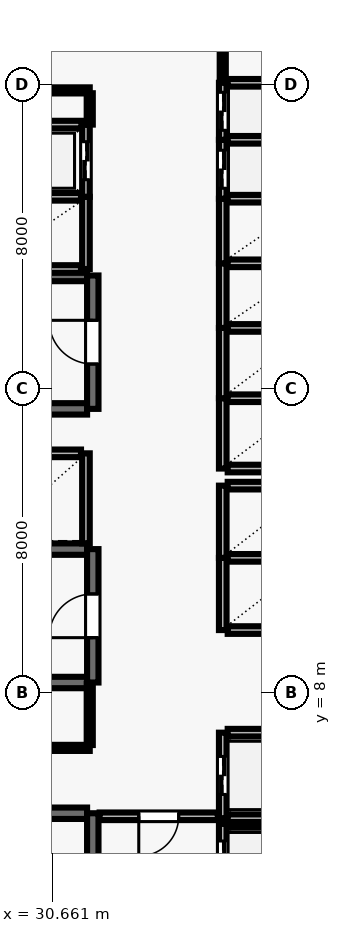
"""IFC4 building model, lengths in metres.
Left out: names, types, materials, properties, quantities, classifications, styles, units other than length and angle.
Written with IfcOpenShell. Run it as: python <this file> out.ifc"""

import sys

from ifc_helpers import new_model, si_unit, direction, frame, frame_2d, origin, place, context, subcontext, project, spatial, rectangle, extrude, element, fill, save


model = new_model("IFC4")
c1 = context("Model", 3, precision=1e-05, world=origin(), true_north=direction((0.0, 1.0)))
c2 = subcontext(c1, "Body", "Model", "MODEL_VIEW")
j1 = project(units=[si_unit("LENGTHUNIT", "METRE"), si_unit("PLANEANGLEUNIT", "RADIAN")], contexts=[c1])
p1 = place(None, origin())
s1 = spatial("IfcSite", under=j1, at=p1, CompositionType="ELEMENT")
p2 = place(p1, origin())
s2 = spatial("IfcBuilding", under=s1, at=p2, CompositionType="ELEMENT")
p3 = place(p2, frame((0.0, 0.0, 26.0)))
s3 = spatial("IfcBuildingStorey", under=s2, at=p3, CompositionType="ELEMENT", Elevation=26.0)
p4 = place(p3, frame((31.58, 4.83, 0.0), z_axis=(0.0, 0.0, 1.0), x_axis=(-1.0, 0.0, 0.0)))
e1 = element("IfcWall", 1, at=p4, inside=s3, PredefinedType="SHEAR", context=c2, shape_type="SweptSolid", body=[
    extrude(rectangle(XDim=8.36, YDim=0.3, at=frame_2d((4.18, 0.0))), origin(), (0.0, 0.0, 1.0), 4.79),
])
p5 = place(p3, frame((31.73, 0.96, 0.0), z_axis=(0.0, 0.0, 1.0), x_axis=(0.0, 1.0, 0.0)))
e2 = element("IfcWall", 2, at=p5, inside=s3, PredefinedType="SHEAR", context=c2, shape_type="SweptSolid", body=[
    extrude(rectangle(XDim=3.87, YDim=0.3, at=frame_2d((1.935, 0.0))), origin(), (0.0, 0.0, 1.0), 4.79),
])
p6 = place(p5, frame((1.54, 0.0, 0.0)))
e3 = element("IfcOpeningElement", 3, at=p6, cuts=e2, PredefinedType="OPENING", context=c2, shape_type="SweptSolid", body=[
    extrude(rectangle(XDim=1.15, YDim=2.15, at=frame_2d((0.575, 1.075))), frame((0.0, 0.16, 0.0), z_axis=(0.0, -1.0, 0.0), x_axis=(1.0, 0.0, 0.0)), (0.0, 0.0, 1.0), 0.32),
])
for number, where, z_axis, x_axis in (
    (4, (31.58, 18.98, 0.0), (0.0, 0.0, 1.0), (-1.0, 0.0, 0.0)),
    (5, (23.22, 15.47, 0.0), (0.0, 0.0, 1.0), (1.0, 0.0, 0.0)),
):
    element("IfcWall", number, at=place(p3, frame(where, z_axis=z_axis, x_axis=x_axis)), inside=s3, PredefinedType="SHEAR", context=c2, shape_type="SweptSolid", body=[
        extrude(rectangle(XDim=8.36, YDim=0.3, at=frame_2d((4.18, 0.0))), origin(), (0.0, 0.0, 1.0), 4.79),
    ])
p7 = place(p3, frame((31.73, 15.47, 0.0), z_axis=(0.0, 0.0, 1.0), x_axis=(0.0, 1.0, 0.0)))
e6 = element("IfcWall", 6, at=p7, inside=s3, PredefinedType="SHEAR", context=c2, shape_type="SweptSolid", body=[
    extrude(rectangle(XDim=3.51, YDim=0.3, at=frame_2d((1.755, 0.0))), origin(), (0.0, 0.0, 1.0), 4.79),
])
p8 = place(p7, frame((1.18, 0.0, 0.0)))
e7 = element("IfcOpeningElement", 7, at=p8, cuts=e6, PredefinedType="OPENING", context=c2, shape_type="SweptSolid", body=[
    extrude(rectangle(XDim=1.15, YDim=2.15, at=frame_2d((0.575, 1.075))), frame((0.0, 0.16, 0.0), z_axis=(0.0, -1.0, 0.0), x_axis=(1.0, 0.0, 0.0)), (0.0, 0.0, 1.0), 0.32),
])
for number, where, z_axis, x_axis in (
    (8, (31.58, 11.78, 0.0), (0.0, 0.0, 1.0), (-1.0, 0.0, 0.0)),
    (9, (23.22, 8.27, 0.0), (0.0, 0.0, 1.0), (1.0, 0.0, 0.0)),
):
    element("IfcWall", number, at=place(p3, frame(where, z_axis=z_axis, x_axis=x_axis)), inside=s3, PredefinedType="SHEAR", context=c2, shape_type="SweptSolid", body=[
        extrude(rectangle(XDim=8.36, YDim=0.3, at=frame_2d((4.18, 0.0))), origin(), (0.0, 0.0, 1.0), 4.79),
    ])
p9 = place(p3, frame((31.73, 8.27, 0.0), z_axis=(0.0, 0.0, 1.0), x_axis=(0.0, 1.0, 0.0)))
e10 = element("IfcWall", 10, at=p9, inside=s3, PredefinedType="SHEAR", context=c2, shape_type="SweptSolid", body=[
    extrude(rectangle(XDim=3.51, YDim=0.3, at=frame_2d((1.755, 0.0))), origin(), (0.0, 0.0, 1.0), 4.79),
])
p10 = place(p9, frame((1.18, 0.0, 0.0)))
e11 = element("IfcOpeningElement", 11, at=p10, cuts=e10, PredefinedType="OPENING", context=c2, shape_type="SweptSolid", body=[
    extrude(rectangle(XDim=1.15, YDim=2.15, at=frame_2d((0.575, 1.075))), frame((0.0, 0.16, 0.0), z_axis=(0.0, -1.0, 0.0), x_axis=(1.0, 0.0, 0.0)), (0.0, 0.0, 1.0), 0.32),
])
p11 = place(p3, frame((35.15, 4.55, 0.0), z_axis=(0.0, 0.0, 1.0), x_axis=(0.0, -1.0, 0.0)))
e12 = element("IfcWall", 12, at=p11, inside=s3, PredefinedType="SOLIDWALL", context=c2, shape_type="SweptSolid", body=[
    extrude(rectangle(XDim=2.1, YDim=0.2, at=frame_2d((1.05, 0.0))), origin(), (0.0, 0.0, 1.0), 4.79),
])
p12 = place(p11, frame((0.45, 0.0, 0.0)))
e13 = element("IfcOpeningElement", 13, at=p12, cuts=e12, PredefinedType="OPENING", context=c2, shape_type="SweptSolid", body=[
    extrude(rectangle(XDim=1.2, YDim=2.15, at=frame_2d((0.6, 1.075))), frame((0.0, 0.11, 0.0), z_axis=(0.0, -1.0, 0.0), x_axis=(1.0, 0.0, 0.0)), (0.0, 0.0, 1.0), 0.22),
])
p13 = place(p3, frame((37.42, 4.55, 0.0), z_axis=(0.0, 0.0, 1.0), x_axis=(-1.0, 0.0, 0.0)))
e14 = element("IfcWall", 14, at=p13, inside=s3, PredefinedType="SOLIDWALL", context=c2, shape_type="SweptSolid", body=[
    extrude(rectangle(XDim=2.14, YDim=0.2, at=frame_2d((1.07, 0.0))), origin(), (0.0, 0.0, 1.0), 4.79),
])
p14 = place(p3, frame((35.15, 6.95, 0.0), z_axis=(0.0, 0.0, 1.0), x_axis=(0.0, -1.0, 0.0)))
e15 = element("IfcWall", 15, at=p14, inside=s3, PredefinedType="SOLIDWALL", context=c2, shape_type="SweptSolid", body=[
    extrude(rectangle(XDim=2.25, YDim=0.2, at=frame_2d((1.125, 0.0))), origin(), (0.0, 0.0, 1.0), 4.79),
])
p15 = place(p14, frame((0.625, 0.0, 0.0)))
e16 = element("IfcOpeningElement", 16, at=p15, cuts=e15, PredefinedType="OPENING", context=c2, shape_type="SweptSolid", body=[
    extrude(rectangle(XDim=1.0, YDim=2.1, at=frame_2d((0.5, 1.05))), frame((0.0, 0.11, 0.0), z_axis=(0.0, -1.0, 0.0), x_axis=(1.0, 0.0, 0.0)), (0.0, 0.0, 1.0), 0.22),
])
for number, where, z_axis, x_axis in (
    (17, (35.28, 4.7, 0.0), (0.0, 0.0, 1.0), (1.0, 0.0, 0.0)),
    (18, (37.42, 6.95, 0.0), (0.0, 0.0, 1.0), (-1.0, 0.0, 0.0)),
):
    element("IfcWall", number, at=place(p3, frame(where, z_axis=z_axis, x_axis=x_axis)), inside=s3, PredefinedType="SOLIDWALL", context=c2, shape_type="SweptSolid", body=[
        extrude(rectangle(XDim=2.14, YDim=0.2, at=frame_2d((1.07, 0.0))), origin(), (0.0, 0.0, 1.0), 4.79),
    ])
p16 = place(p3, frame((35.15, 11.55, 0.0), z_axis=(0.0, 0.0, 1.0), x_axis=(0.0, -1.0, 0.0)))
e19 = element("IfcWall", 19, at=p16, inside=s3, PredefinedType="SOLIDWALL", context=c2, shape_type="SweptSolid", body=[
    extrude(rectangle(XDim=1.9, YDim=0.2, at=frame_2d((0.95, 0.0))), origin(), (0.0, 0.0, 1.0), 4.79),
])
for number, where, z_axis, x_axis in (
    (20, (35.28, 9.65, 0.0), (0.0, 0.0, 1.0), (1.0, 0.0, 0.0)),
    (21, (37.42, 11.55, 0.0), (0.0, 0.0, 1.0), (-1.0, 0.0, 0.0)),
):
    element("IfcWall", number, at=place(p3, frame(where, z_axis=z_axis, x_axis=x_axis)), inside=s3, PredefinedType="SOLIDWALL", context=c2, shape_type="SweptSolid", body=[
        extrude(rectangle(XDim=2.14, YDim=0.2, at=frame_2d((1.07, 0.0))), origin(), (0.0, 0.0, 1.0), 4.79),
    ])
p17 = place(p3, frame((35.15, 13.45, 0.0), z_axis=(0.0, 0.0, 1.0), x_axis=(0.0, -1.0, 0.0)))
e22 = element("IfcWall", 22, at=p17, inside=s3, PredefinedType="SOLIDWALL", context=c2, shape_type="SweptSolid", body=[
    extrude(rectangle(XDim=1.9, YDim=0.2, at=frame_2d((0.95, 0.0))), origin(), (0.0, 0.0, 1.0), 4.79),
])
p18 = place(p3, frame((37.42, 13.45, 0.0), z_axis=(0.0, 0.0, 1.0), x_axis=(-1.0, 0.0, 0.0)))
e23 = element("IfcWall", 23, at=p18, inside=s3, PredefinedType="SOLIDWALL", context=c2, shape_type="SweptSolid", body=[
    extrude(rectangle(XDim=2.14, YDim=0.2, at=frame_2d((1.07, 0.0))), origin(), (0.0, 0.0, 1.0), 4.79),
])
p19 = place(p3, frame((31.55, 11.93, 0.0), z_axis=(0.0, 0.0, 1.0), x_axis=(0.0, 1.0, 0.0)))
e24 = element("IfcWall", 24, at=p19, inside=s3, PredefinedType="SOLIDWALL", context=c2, shape_type="SweptSolid", body=[
    extrude(rectangle(XDim=2.37, YDim=0.2, at=frame_2d((1.185, 0.0))), origin(), (0.0, 0.0, 1.0), 4.79),
])
p20 = place(p3, frame((31.42, 14.3, 0.0), z_axis=(0.0, 0.0, 1.0), x_axis=(-1.0, 0.0, 0.0)))
e25 = element("IfcWall", 25, at=p20, inside=s3, PredefinedType="SOLIDWALL", context=c2, shape_type="SweptSolid", body=[
    extrude(rectangle(XDim=2.44, YDim=0.2, at=frame_2d((1.22, 0.0))), origin(), (0.0, 0.0, 1.0), 4.79),
])
p21 = place(p3, frame((35.15, 15.75, 0.0), z_axis=(0.0, 0.0, 1.0), x_axis=(0.0, -1.0, 0.0)))
e26 = element("IfcWall", 26, at=p21, inside=s3, PredefinedType="SOLIDWALL", context=c2, shape_type="SweptSolid", body=[
    extrude(rectangle(XDim=1.85, YDim=0.2, at=frame_2d((0.925, 0.0))), origin(), (0.0, 0.0, 1.0), 4.79),
])
for number, where, z_axis, x_axis in (
    (27, (35.28, 13.9, 0.0), (0.0, 0.0, 1.0), (1.0, 0.0, 0.0)),
    (28, (37.42, 15.75, 0.0), (0.0, 0.0, 1.0), (-1.0, 0.0, 0.0)),
):
    element("IfcWall", number, at=place(p3, frame(where, z_axis=z_axis, x_axis=x_axis)), inside=s3, PredefinedType="SOLIDWALL", context=c2, shape_type="SweptSolid", body=[
        extrude(rectangle(XDim=2.14, YDim=0.2, at=frame_2d((1.07, 0.0))), origin(), (0.0, 0.0, 1.0), 4.79),
    ])
p22 = place(p3, frame((35.15, 17.6, 0.0), z_axis=(0.0, 0.0, 1.0), x_axis=(0.0, -1.0, 0.0)))
e29 = element("IfcWall", 29, at=p22, inside=s3, PredefinedType="SOLIDWALL", context=c2, shape_type="SweptSolid", body=[
    extrude(rectangle(XDim=1.85, YDim=0.2, at=frame_2d((0.925, 0.0))), origin(), (0.0, 0.0, 1.0), 4.79),
])
p23 = place(p3, frame((37.42, 17.6, 0.0), z_axis=(0.0, 0.0, 1.0), x_axis=(-1.0, 0.0, 0.0)))
e30 = element("IfcWall", 30, at=p23, inside=s3, PredefinedType="SOLIDWALL", context=c2, shape_type="SweptSolid", body=[
    extrude(rectangle(XDim=2.14, YDim=0.2, at=frame_2d((1.07, 0.0))), origin(), (0.0, 0.0, 1.0), 4.79),
])
p24 = place(p3, frame((35.15, 19.3, 0.0), z_axis=(0.0, 0.0, 1.0), x_axis=(0.0, -1.0, 0.0)))
e31 = element("IfcWall", 31, at=p24, inside=s3, PredefinedType="SOLIDWALL", context=c2, shape_type="SweptSolid", body=[
    extrude(rectangle(XDim=1.7, YDim=0.2, at=frame_2d((0.85, 0.0))), origin(), (0.0, 0.0, 1.0), 4.79),
])
p25 = place(p3, frame((37.42, 19.3, 0.0), z_axis=(0.0, 0.0, 1.0), x_axis=(-1.0, 0.0, 0.0)))
e32 = element("IfcWall", 32, at=p25, inside=s3, PredefinedType="SOLIDWALL", context=c2, shape_type="SweptSolid", body=[
    extrude(rectangle(XDim=2.14, YDim=0.2, at=frame_2d((1.07, 0.0))), origin(), (0.0, 0.0, 1.0), 4.79),
])
p26 = place(p3, frame((35.15, 21.0, 0.0), z_axis=(0.0, 0.0, 1.0), x_axis=(0.0, -1.0, 0.0)))
e33 = element("IfcWall", 33, at=p26, inside=s3, PredefinedType="SOLIDWALL", context=c2, shape_type="SweptSolid", body=[
    extrude(rectangle(XDim=1.7, YDim=0.2, at=frame_2d((0.85, 0.0))), origin(), (0.0, 0.0, 1.0), 4.79),
])
p27 = place(p3, frame((37.42, 21.0, 0.0), z_axis=(0.0, 0.0, 1.0), x_axis=(-1.0, 0.0, 0.0)))
e34 = element("IfcWall", 34, at=p27, inside=s3, PredefinedType="SOLIDWALL", context=c2, shape_type="SweptSolid", body=[
    extrude(rectangle(XDim=2.14, YDim=0.2, at=frame_2d((1.07, 0.0))), origin(), (0.0, 0.0, 1.0), 4.79),
])
p28 = place(p3, frame((31.55, 19.15, 0.0), z_axis=(0.0, 0.0, 1.0), x_axis=(0.0, 1.0, 0.0)))
e35 = element("IfcWall", 35, at=p28, inside=s3, PredefinedType="SOLIDWALL", context=c2, shape_type="SweptSolid", body=[
    extrude(rectangle(XDim=1.9, YDim=0.2, at=frame_2d((0.95, 0.0))), origin(), (0.0, 0.0, 1.0), 4.79),
])
for number, where, z_axis, x_axis in (
    (36, (28.98, 19.15, 0.0), (0.0, 0.0, 1.0), (1.0, 0.0, 0.0)),
    (37, (31.42, 21.05, 0.0), (0.0, 0.0, 1.0), (-1.0, 0.0, 0.0)),
):
    element("IfcWall", number, at=place(p3, frame(where, z_axis=z_axis, x_axis=x_axis)), inside=s3, PredefinedType="SOLIDWALL", context=c2, shape_type="SweptSolid", body=[
        extrude(rectangle(XDim=2.44, YDim=0.2, at=frame_2d((1.22, 0.0))), origin(), (0.0, 0.0, 1.0), 4.79),
    ])
p29 = place(p3, frame((35.15, 22.55, 0.0), z_axis=(0.0, 0.0, 1.0), x_axis=(0.0, -1.0, 0.0)))
e38 = element("IfcWall", 38, at=p29, inside=s3, PredefinedType="SOLIDWALL", context=c2, shape_type="SweptSolid", body=[
    extrude(rectangle(XDim=1.55, YDim=0.2, at=frame_2d((0.775, 0.0))), origin(), (0.0, 0.0, 1.0), 4.79),
])
p30 = place(p29, frame((0.275, 0.0, 0.0)))
e39 = element("IfcOpeningElement", 39, at=p30, cuts=e38, PredefinedType="OPENING", context=c2, shape_type="SweptSolid", body=[
    extrude(rectangle(XDim=1.0, YDim=2.1, at=frame_2d((0.5, 1.05))), frame((0.0, 0.11, 0.0), z_axis=(0.0, -1.0, 0.0), x_axis=(1.0, 0.0, 0.0)), (0.0, 0.0, 1.0), 0.22),
])
p31 = place(p3, frame((37.42, 22.55, 0.0), z_axis=(0.0, 0.0, 1.0), x_axis=(-1.0, 0.0, 0.0)))
e40 = element("IfcWall", 40, at=p31, inside=s3, PredefinedType="SOLIDWALL", context=c2, shape_type="SweptSolid", body=[
    extrude(rectangle(XDim=2.14, YDim=0.2, at=frame_2d((1.07, 0.0))), origin(), (0.0, 0.0, 1.0), 4.79),
])
p32 = place(p3, frame((35.15, 24.05, 0.0), z_axis=(0.0, 0.0, 1.0), x_axis=(0.0, -1.0, 0.0)))
e41 = element("IfcWall", 41, at=p32, inside=s3, PredefinedType="SOLIDWALL", context=c2, shape_type="SweptSolid", body=[
    extrude(rectangle(XDim=1.5, YDim=0.2, at=frame_2d((0.75, 0.0))), origin(), (0.0, 0.0, 1.0), 4.79),
])
p33 = place(p32, frame((0.25, 0.0, 0.0)))
e42 = element("IfcOpeningElement", 42, at=p33, cuts=e41, PredefinedType="OPENING", context=c2, shape_type="SweptSolid", body=[
    extrude(rectangle(XDim=1.0, YDim=2.1, at=frame_2d((0.5, 1.05))), frame((0.0, 0.11, 0.0), z_axis=(0.0, -1.0, 0.0), x_axis=(1.0, 0.0, 0.0)), (0.0, 0.0, 1.0), 0.22),
])
p34 = place(p3, frame((37.42, 24.05, 0.0), z_axis=(0.0, 0.0, 1.0), x_axis=(-1.0, 0.0, 0.0)))
e43 = element("IfcWall", 43, at=p34, inside=s3, PredefinedType="SOLIDWALL", context=c2, shape_type="SweptSolid", body=[
    extrude(rectangle(XDim=2.14, YDim=0.2, at=frame_2d((1.07, 0.0))), origin(), (0.0, 0.0, 1.0), 4.79),
])
p35 = place(p3, frame((31.55, 21.05, 0.0), z_axis=(0.0, 0.0, 1.0), x_axis=(0.0, 1.0, 0.0)))
e44 = element("IfcWall", 44, at=p35, inside=s3, PredefinedType="SOLIDWALL", context=c2, shape_type="SweptSolid", body=[
    extrude(rectangle(XDim=1.9, YDim=0.2, at=frame_2d((0.95, 0.0))), origin(), (0.0, 0.0, 1.0), 4.79),
])
p36 = place(p35, frame((0.45, 0.0, 0.0)))
e45 = element("IfcOpeningElement", 45, at=p36, cuts=e44, PredefinedType="OPENING", context=c2, shape_type="SweptSolid", body=[
    extrude(rectangle(XDim=1.0, YDim=2.1, at=frame_2d((0.5, 1.05))), frame((0.0, 0.11, 0.0), z_axis=(0.0, -1.0, 0.0), x_axis=(1.0, 0.0, 0.0)), (0.0, 0.0, 1.0), 0.22),
])
p37 = place(p3, frame((31.43, 22.95, 0.0), z_axis=(0.0, 0.0, 1.0), x_axis=(-1.0, 0.0, 0.0)))
e46 = element("IfcWall", 46, at=p37, inside=s3, PredefinedType="SOLIDWALL", context=c2, shape_type="SweptSolid", body=[
    extrude(rectangle(XDim=2.46, YDim=0.2, at=frame_2d((1.23, 0.0))), origin(), (0.0, 0.0, 1.0), 4.79),
])
p38 = place(p3, frame((28.8, 23.85, 0.0), z_axis=(0.0, 0.0, 1.0), x_axis=(1.0, 0.0, 0.0)))
e47 = element("IfcWall", 47, at=p38, inside=s3, PredefinedType="PARTITIONING", context=c2, shape_type="SweptSolid", body=[
    extrude(rectangle(XDim=2.85, YDim=0.16, at=frame_2d((1.425, 0.0))), origin(), (0.0, 0.0, 1.0), 4.79),
])
p39 = place(p3, frame((31.65, 6.55, 0.0), z_axis=(0.0, 0.0, 1.0), x_axis=(-1.0, 0.0, 0.0)))
e48 = element("IfcWall", 48, at=p39, inside=s3, PredefinedType="PARTITIONING", context=c2, shape_type="SweptSolid", body=[
    extrude(rectangle(XDim=4.75, YDim=0.16, at=frame_2d((2.375, 0.0))), origin(), (0.0, 0.0, 1.0), 4.79),
])
p40 = place(p39, frame((1.935, 0.0, 0.0)))
e49 = element("IfcOpeningElement", 49, at=p40, cuts=e48, PredefinedType="OPENING", context=c2, shape_type="SweptSolid", body=[
    extrude(rectangle(XDim=0.88, YDim=2.1, at=frame_2d((0.44, 1.05))), frame((0.0, 0.09, 0.0), z_axis=(0.0, -1.0, 0.0), x_axis=(1.0, 0.0, 0.0)), (0.0, 0.0, 1.0), 0.18),
])
p41 = place(p3, frame((35.02, 4.75, 0.0), z_axis=(0.0, 0.0, 1.0), x_axis=(-1.0, 0.0, 0.0)))
e50 = element("IfcWall", 50, at=p41, inside=s3, PredefinedType="SOLIDWALL", context=c2, shape_type="SweptSolid", body=[
    extrude(rectangle(XDim=3.11, YDim=0.2, at=frame_2d((1.555, 0.0))), origin(), (0.0, 0.0, 1.0), 4.79),
])
p42 = place(p41, frame((1.03, 0.0, 0.0)))
e51 = element("IfcOpeningElement", 51, at=p42, cuts=e50, PredefinedType="OPENING", context=c2, shape_type="SweptSolid", body=[
    extrude(rectangle(XDim=1.05, YDim=2.15, at=frame_2d((0.525, 1.075))), frame((0.0, 0.11, 0.0), z_axis=(0.0, -1.0, 0.0), x_axis=(1.0, 0.0, 0.0)), (0.0, 0.0, 1.0), 0.22),
])
p43 = place(p3, frame((31.65, 8.24, 0.0), z_axis=(0.0, 0.0, 1.0), x_axis=(0.0, -1.0, 0.0)))
e52 = element("IfcWall", 52, at=p43, inside=s3, PredefinedType="PARTITIONING", context=c2, shape_type="SweptSolid", body=[
    extrude(rectangle(XDim=1.615, YDim=0.16, at=frame_2d((0.808, 0.0))), origin(), (0.0, 0.0, 1.0), 4.79),
])
p44 = place(p3, frame((31.65, 23.775, 0.0), z_axis=(0.0, 0.0, 1.0), x_axis=(0.0, -1.0, 0.0)))
e53 = element("IfcWall", 53, at=p44, inside=s3, PredefinedType="PARTITIONING", context=c2, shape_type="SweptSolid", body=[
    extrude(rectangle(XDim=0.825, YDim=0.16, at=frame_2d((0.413, 0.0))), origin(), (0.0, 0.0, 1.0), 4.79),
])
p45 = place(p3, frame((35.15, 24.07, 0.0), z_axis=(0.0, 0.0, 1.0), x_axis=(0.0, 1.0, 0.0)))
e54 = element("IfcWall", 54, at=p45, inside=s3, PredefinedType="PARTITIONING", context=c2, shape_type="SweptSolid", body=[
    extrude(rectangle(XDim=1.855, YDim=0.16, at=frame_2d((0.927, 0.0))), origin(), (0.0, 0.0, 1.0), 4.79),
])
p46 = place(p8, origin())
e55 = element("IfcDoor", 55, at=p46, inside=s3, OperationType="SINGLE_SWING_RIGHT", PredefinedType="DOOR", context=c2, shape_type="SweptSolid", body=[
    extrude(rectangle(XDim=1.15, YDim=2.15, at=frame_2d((0.575, 1.075))), frame((0.0, 0.025, 0.0), z_axis=(0.0, -1.0, 0.0), x_axis=(1.0, 0.0, 0.0)), (0.0, 0.0, 1.0), 0.05),
])
fill(e7, e55)
p47 = place(p10, origin())
e56 = element("IfcDoor", 56, at=p47, inside=s3, OperationType="SINGLE_SWING_LEFT", PredefinedType="DOOR", context=c2, shape_type="SweptSolid", body=[
    extrude(rectangle(XDim=1.15, YDim=2.15, at=frame_2d((0.575, 1.075))), frame((0.0, 0.025, 0.0), z_axis=(0.0, -1.0, 0.0), x_axis=(1.0, 0.0, 0.0)), (0.0, 0.0, 1.0), 0.05),
])
fill(e11, e56)
p48 = place(p12, origin())
e57 = element("IfcDoor", 57, at=p48, inside=s3, OperationType="DOUBLE_DOOR_SLIDING", PredefinedType="DOOR", context=c2, shape_type="SweptSolid", body=[
    extrude(rectangle(XDim=1.2, YDim=2.15, at=frame_2d((0.6, 1.075))), frame((0.0, 0.025, 0.0), z_axis=(0.0, -1.0, 0.0), x_axis=(1.0, 0.0, 0.0)), (0.0, 0.0, 1.0), 0.05),
])
fill(e13, e57)
p49 = place(p15, origin())
e58 = element("IfcDoor", 58, at=p49, inside=s3, OperationType="DOUBLE_DOOR_SLIDING", PredefinedType="DOOR", context=c2, shape_type="SweptSolid", body=[
    extrude(rectangle(XDim=1.0, YDim=2.1, at=frame_2d((0.5, 1.05))), frame((0.0, 0.025, 0.0), z_axis=(0.0, -1.0, 0.0), x_axis=(1.0, 0.0, 0.0)), (0.0, 0.0, 1.0), 0.05),
])
fill(e16, e58)
p50 = place(p30, origin())
e59 = element("IfcDoor", 59, at=p50, inside=s3, OperationType="DOUBLE_DOOR_SLIDING", PredefinedType="DOOR", context=c2, shape_type="SweptSolid", body=[
    extrude(rectangle(XDim=1.0, YDim=2.1, at=frame_2d((0.5, 1.05))), frame((0.0, 0.025, 0.0), z_axis=(0.0, -1.0, 0.0), x_axis=(1.0, 0.0, 0.0)), (0.0, 0.0, 1.0), 0.05),
])
fill(e39, e59)
p51 = place(p33, origin())
e60 = element("IfcDoor", 60, at=p51, inside=s3, OperationType="DOUBLE_DOOR_SLIDING", PredefinedType="DOOR", context=c2, shape_type="SweptSolid", body=[
    extrude(rectangle(XDim=1.0, YDim=2.1, at=frame_2d((0.5, 1.05))), frame((0.0, 0.025, 0.0), z_axis=(0.0, -1.0, 0.0), x_axis=(1.0, 0.0, 0.0)), (0.0, 0.0, 1.0), 0.05),
])
fill(e42, e60)
p52 = place(p36, origin())
e61 = element("IfcDoor", 61, at=p52, inside=s3, OperationType="DOUBLE_DOOR_SLIDING", PredefinedType="DOOR", context=c2, shape_type="SweptSolid", body=[
    extrude(rectangle(XDim=1.0, YDim=2.1, at=frame_2d((0.5, 1.05))), frame((0.0, 0.025, 0.0), z_axis=(0.0, -1.0, 0.0), x_axis=(1.0, 0.0, 0.0)), (0.0, 0.0, 1.0), 0.05),
])
fill(e45, e61)
p53 = place(p42, origin())
e62 = element("IfcDoor", 62, at=p53, inside=s3, OperationType="SINGLE_SWING_RIGHT", PredefinedType="DOOR", context=c2, shape_type="SweptSolid", body=[
    extrude(rectangle(XDim=1.05, YDim=2.15, at=frame_2d((0.525, 1.075))), frame((0.0, 0.025, 0.0), z_axis=(0.0, -1.0, 0.0), x_axis=(1.0, 0.0, 0.0)), (0.0, 0.0, 1.0), 0.05),
])
fill(e51, e62)
save(model, sys.argv[1])
